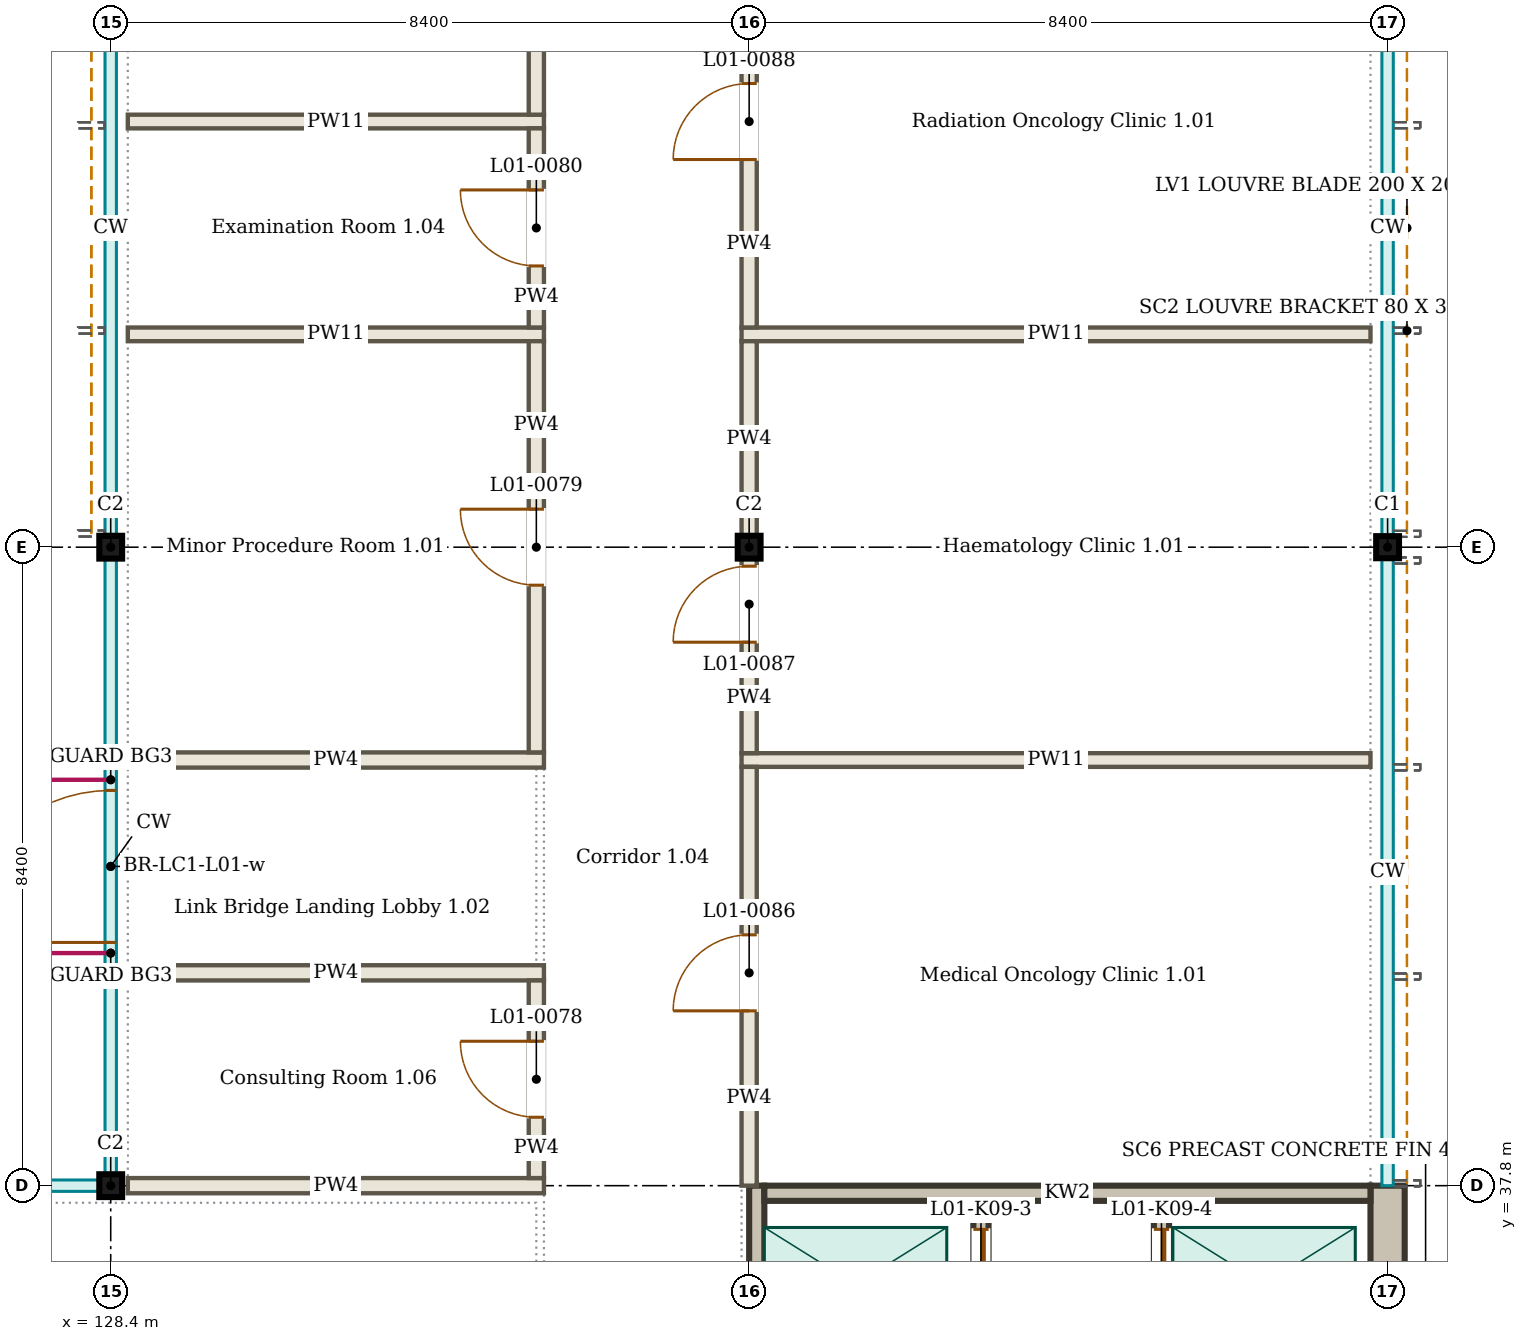
"""IFC4 building model, lengths in metres.
Left out: names, types, materials, properties, quantities, classifications, styles, units other than length and angle.
Written with IfcOpenShell. Run it as: python <this file> out.ifc"""

import sys

from ifc_helpers import new_model, si_unit, direction, frame, frame_2d, origin, origin_2d, place, context, subcontext, project, spatial, rectangle, i_section, extrude, element, fill, save


model = new_model("IFC4")
c1 = context("Model", 3, precision=1e-05, world=origin(), true_north=direction((0.0, 1.0)))
c2 = subcontext(c1, "Body", "Model", "MODEL_VIEW")
j1 = project(units=[si_unit("LENGTHUNIT", "METRE"), si_unit("PLANEANGLEUNIT", "RADIAN")], contexts=[c1])
p1 = place(None, origin())
s1 = spatial("IfcSite", under=j1, at=p1, CompositionType="ELEMENT")
p2 = place(p1, origin())
s2 = spatial("IfcBuilding", under=s1, at=p2, CompositionType="ELEMENT")
p3 = place(p2, frame((0.0, 0.0, 4.5)))
s3 = spatial("IfcBuildingStorey", under=s2, at=p3, CompositionType="ELEMENT", Elevation=4.5)
for number, where, z_axis, x_axis in (
    (1, (128.4, 37.8, 0.0), (0.0, 0.0, 1.0), (1.0, 0.0, 0.0)),
    (2, (128.4, 46.2, 0.0), (0.0, 0.0, 1.0), (1.0, 0.0, 0.0)),
    (3, (136.8, 46.2, 0.0), (0.0, 0.0, 1.0), (1.0, 0.0, 0.0)),
):
    element("IfcColumn", number, at=place(p3, frame(where, z_axis=z_axis, x_axis=x_axis)), inside=s3, PredefinedType="COLUMN", context=c2, shape_type="SweptSolid", body=[
        extrude(i_section(OverallWidth=0.3, OverallDepth=0.3, WebThickness=0.011, FlangeThickness=0.019, FilletRadius=0.027, at=origin_2d()), origin(), (0.0, 0.0, 1.0), 4.5),
    ])
p4 = place(p3, frame((145.2, 46.2, 0.0), z_axis=(0.0, 0.0, 1.0), x_axis=(1.0, 0.0, 0.0)))
e4 = element("IfcColumn", 4, at=p4, inside=s3, PredefinedType="COLUMN", context=c2, shape_type="SweptSolid", body=[
    extrude(i_section(OverallWidth=0.3, OverallDepth=0.29, WebThickness=0.009, FlangeThickness=0.014, FilletRadius=0.027, at=origin_2d()), origin(), (0.0, 0.0, 1.0), 4.5),
])
p5 = place(p3, frame((128.625, 37.8, 0.0), z_axis=(0.0, 0.0, 1.0), x_axis=(1.0, 0.0, 0.0)))
e5 = element("IfcWall", 5, at=p5, inside=s3, PredefinedType="PARTITIONING", context=c2, shape_type="SweptSolid", body=[
    extrude(rectangle(XDim=5.475, YDim=0.2, at=frame_2d((2.738, 0.0))), origin(), (0.0, 0.0, 1.0), 3.9),
])
for number, where, z_axis, x_axis in (
    (6, (128.625, 40.6, 0.0), (0.0, 0.0, 1.0), (1.0, 0.0, 0.0)),
    (7, (128.625, 43.4, 0.0), (0.0, 0.0, 1.0), (1.0, 0.0, 0.0)),
):
    element("IfcWall", number, at=place(p3, frame(where, z_axis=z_axis, x_axis=x_axis)), inside=s3, PredefinedType="PARTITIONING", context=c2, shape_type="SweptSolid", body=[
        extrude(rectangle(XDim=5.475, YDim=0.2, at=frame_2d((2.738, 0.0))), origin(), (0.0, 0.0, 1.0), 3.996),
    ])
p6 = place(p3, frame((136.7, 43.4, 0.0), z_axis=(0.0, 0.0, 1.0), x_axis=(1.0, 0.0, 0.0)))
e8 = element("IfcWall", 8, at=p6, inside=s3, PredefinedType="PARTITIONING", context=c2, shape_type="SweptSolid", body=[
    extrude(rectangle(XDim=8.275, YDim=0.18, at=frame_2d((4.138, 0.0))), origin(), (0.0, 0.0, 1.0), 3.9),
])
p7 = place(p3, frame((128.625, 49.0, 0.0), z_axis=(0.0, 0.0, 1.0), x_axis=(1.0, 0.0, 0.0)))
e9 = element("IfcWall", 9, at=p7, inside=s3, PredefinedType="PARTITIONING", context=c2, shape_type="SweptSolid", body=[
    extrude(rectangle(XDim=5.475, YDim=0.18, at=frame_2d((2.738, 0.0))), origin(), (0.0, 0.0, 1.0), 3.996),
])
p8 = place(p3, frame((136.7, 49.0, 0.0), z_axis=(0.0, 0.0, 1.0), x_axis=(1.0, 0.0, 0.0)))
e10 = element("IfcWall", 10, at=p8, inside=s3, PredefinedType="PARTITIONING", context=c2, shape_type="SweptSolid", body=[
    extrude(rectangle(XDim=8.275, YDim=0.18, at=frame_2d((4.138, 0.0))), origin(), (0.0, 0.0, 1.0), 3.9),
])
p9 = place(p3, frame((128.625, 51.8, 0.0), z_axis=(0.0, 0.0, 1.0), x_axis=(1.0, 0.0, 0.0)))
e11 = element("IfcWall", 11, at=p9, inside=s3, PredefinedType="PARTITIONING", context=c2, shape_type="SweptSolid", body=[
    extrude(rectangle(XDim=5.475, YDim=0.18, at=frame_2d((2.738, 0.0))), origin(), (0.0, 0.0, 1.0), 3.996),
])
p10 = place(p3, frame((134.0, 37.9, 0.0), z_axis=(0.0, 0.0, 1.0), x_axis=(0.0, 1.0, 0.0)))
e12 = element("IfcWall", 12, at=p10, inside=s3, PredefinedType="PARTITIONING", context=c2, shape_type="SweptSolid", body=[
    extrude(rectangle(XDim=2.6, YDim=0.2, at=frame_2d((1.3, 0.0))), origin(), (0.0, 0.0, 1.0), 3.996),
])
p11 = place(p10, frame((0.8, 0.0, 0.0)))
e13 = element("IfcOpeningElement", 13, at=p11, cuts=e12, PredefinedType="OPENING", context=c2, shape_type="SweptSolid", body=[
    extrude(rectangle(XDim=1.0, YDim=2.1, at=frame_2d((0.5, 1.05))), frame((0.0, 0.11, 0.0), z_axis=(0.0, -1.0, 0.0), x_axis=(1.0, 0.0, 0.0)), (0.0, 0.0, 1.0), 0.22),
])
p12 = place(p3, frame((134.0, 43.5, 0.0), z_axis=(0.0, 0.0, 1.0), x_axis=(0.0, 1.0, 0.0)))
e14 = element("IfcWall", 14, at=p12, inside=s3, PredefinedType="PARTITIONING", context=c2, shape_type="SweptSolid", body=[
    extrude(rectangle(XDim=5.41, YDim=0.2, at=frame_2d((2.705, 0.0))), origin(), (0.0, 0.0, 1.0), 3.9),
])
p13 = place(p12, frame((2.2, 0.0, 0.0)))
e15 = element("IfcOpeningElement", 15, at=p13, cuts=e14, PredefinedType="OPENING", context=c2, shape_type="SweptSolid", body=[
    extrude(rectangle(XDim=1.0, YDim=2.1, at=frame_2d((0.5, 1.05))), frame((0.0, 0.11, 0.0), z_axis=(0.0, -1.0, 0.0), x_axis=(1.0, 0.0, 0.0)), (0.0, 0.0, 1.0), 0.22),
])
p14 = place(p3, frame((134.0, 49.09, 0.0), z_axis=(0.0, 0.0, 1.0), x_axis=(0.0, 1.0, 0.0)))
e16 = element("IfcWall", 16, at=p14, inside=s3, PredefinedType="PARTITIONING", context=c2, shape_type="SweptSolid", body=[
    extrude(rectangle(XDim=2.62, YDim=0.2, at=frame_2d((1.31, 0.0))), origin(), (0.0, 0.0, 1.0), 3.996),
])
p15 = place(p14, frame((0.81, 0.0, 0.0)))
e17 = element("IfcOpeningElement", 17, at=p15, cuts=e16, PredefinedType="OPENING", context=c2, shape_type="SweptSolid", body=[
    extrude(rectangle(XDim=1.0, YDim=2.1, at=frame_2d((0.5, 1.05))), frame((0.0, 0.11, 0.0), z_axis=(0.0, -1.0, 0.0), x_axis=(1.0, 0.0, 0.0)), (0.0, 0.0, 1.0), 0.22),
])
p16 = place(p3, frame((134.0, 51.89, 0.0), z_axis=(0.0, 0.0, 1.0), x_axis=(0.0, 1.0, 0.0)))
e18 = element("IfcWall", 18, at=p16, inside=s3, PredefinedType="PARTITIONING", context=c2, shape_type="SweptSolid", body=[
    extrude(rectangle(XDim=2.61, YDim=0.2, at=frame_2d((1.305, 0.0))), origin(), (0.0, 0.0, 1.0), 3.996),
])
p17 = place(p3, frame((136.8, 37.8, 0.0), z_axis=(0.0, 0.0, 1.0), x_axis=(0.0, 1.0, 0.0)))
e19 = element("IfcWall", 19, at=p17, inside=s3, PredefinedType="PARTITIONING", context=c2, shape_type="SweptSolid", body=[
    extrude(rectangle(XDim=5.51, YDim=0.2, at=frame_2d((2.755, 0.0))), origin(), (0.0, 0.0, 1.0), 3.9),
])
p18 = place(p17, frame((2.3, 0.0, 0.0)))
e20 = element("IfcOpeningElement", 20, at=p18, cuts=e19, PredefinedType="OPENING", context=c2, shape_type="SweptSolid", body=[
    extrude(rectangle(XDim=1.0, YDim=2.1, at=frame_2d((0.5, 1.05))), frame((0.0, 0.11, 0.0), z_axis=(0.0, -1.0, 0.0), x_axis=(1.0, 0.0, 0.0)), (0.0, 0.0, 1.0), 0.22),
])
p19 = place(p3, frame((136.8, 43.49, 0.0), z_axis=(0.0, 0.0, 1.0), x_axis=(0.0, 1.0, 0.0)))
e21 = element("IfcWall", 21, at=p19, inside=s3, PredefinedType="PARTITIONING", context=c2, shape_type="SweptSolid", body=[
    extrude(rectangle(XDim=2.56, YDim=0.2, at=frame_2d((1.28, 0.0))), origin(), (0.0, 0.0, 1.0), 3.9),
])
p20 = place(p19, frame((1.46, 0.0, 0.0)))
e22 = element("IfcOpeningElement", 22, at=p20, cuts=e21, PredefinedType="OPENING", context=c2, shape_type="SweptSolid", body=[
    extrude(rectangle(XDim=1.0, YDim=2.1, at=frame_2d((0.5, 1.05))), frame((0.0, 0.11, 0.0), z_axis=(0.0, -1.0, 0.0), x_axis=(1.0, 0.0, 0.0)), (0.0, 0.0, 1.0), 0.22),
])
p21 = place(p3, frame((136.8, 46.35, 0.0), z_axis=(0.0, 0.0, 1.0), x_axis=(0.0, 1.0, 0.0)))
e23 = element("IfcWall", 23, at=p21, inside=s3, PredefinedType="PARTITIONING", context=c2, shape_type="SweptSolid", body=[
    extrude(rectangle(XDim=2.56, YDim=0.2, at=frame_2d((1.28, 0.0))), origin(), (0.0, 0.0, 1.0), 3.9),
])
p22 = place(p3, frame((136.8, 49.09, 0.0), z_axis=(0.0, 0.0, 1.0), x_axis=(0.0, 1.0, 0.0)))
e24 = element("IfcWall", 24, at=p22, inside=s3, PredefinedType="PARTITIONING", context=c2, shape_type="SweptSolid", body=[
    extrude(rectangle(XDim=5.36, YDim=0.2, at=frame_2d((2.68, 0.0))), origin(), (0.0, 0.0, 1.0), 3.9),
])
p23 = place(p22, frame((2.21, 0.0, 0.0)))
e25 = element("IfcOpeningElement", 25, at=p23, cuts=e24, PredefinedType="OPENING", context=c2, shape_type="SweptSolid", body=[
    extrude(rectangle(XDim=1.0, YDim=2.1, at=frame_2d((0.5, 1.05))), frame((0.0, 0.11, 0.0), z_axis=(0.0, -1.0, 0.0), x_axis=(1.0, 0.0, 0.0)), (0.0, 0.0, 1.0), 0.22),
])
p24 = place(p3, frame((136.9, 29.625, 0.0), z_axis=(0.0, 0.0, 1.0), x_axis=(0.0, 1.0, 0.0)))
e26 = element("IfcWall", 26, at=p24, inside=s3, PredefinedType="SOLIDWALL", context=c2, shape_type="SweptSolid", body=[
    extrude(rectangle(XDim=8.175, YDim=0.2, at=frame_2d((4.087, 0.0))), origin(), (0.0, 0.0, 1.0), 4.5),
])
p25 = place(p24, frame((4.512, 0.0, 0.0)))
e27 = element("IfcOpeningElement", 27, at=p25, cuts=e26, PredefinedType="OPENING", context=c2, shape_type="SweptSolid", body=[
    extrude(rectangle(XDim=1.3, YDim=2.1, at=frame_2d((0.65, 1.05))), frame((0.0, 0.11, 0.0), z_axis=(0.0, -1.0, 0.0), x_axis=(1.0, 0.0, 0.0)), (0.0, 0.0, 1.0), 0.22),
])
p26 = place(p3, frame((145.2, 29.175, 0.0), z_axis=(0.0, 0.0, 1.0), x_axis=(0.0, 1.0, 0.0)))
e28 = element("IfcWall", 28, at=p26, inside=s3, PredefinedType="SOLIDWALL", context=c2, shape_type="SweptSolid", body=[
    extrude(rectangle(XDim=8.625, YDim=0.45, at=frame_2d((4.312, 0.0))), origin(), (0.0, 0.0, 1.0), 4.5),
])
p27 = place(p3, frame((137.0, 37.7, 0.0), z_axis=(0.0, 0.0, 1.0), x_axis=(1.0, 0.0, 0.0)))
e29 = element("IfcWall", 29, at=p27, inside=s3, PredefinedType="SOLIDWALL", context=c2, shape_type="SweptSolid", body=[
    extrude(rectangle(XDim=7.975, YDim=0.2, at=frame_2d((3.988, 0.0))), origin(), (0.0, 0.0, 1.0), 4.5),
])
p28 = place(p3, frame((139.85, 35.75, 0.0), z_axis=(0.0, 0.0, 1.0), x_axis=(0.0, 1.0, 0.0)))
e30 = element("IfcWall", 30, at=p28, inside=s3, PredefinedType="SOLIDWALL", context=c2, shape_type="SweptSolid", body=[
    extrude(rectangle(XDim=1.85, YDim=0.2, at=frame_2d((0.925, 0.0))), origin(), (0.0, 0.0, 1.0), 4.5),
])
p29 = place(p28, frame((0.375, 0.0, 0.0)))
e31 = element("IfcOpeningElement", 31, at=p29, cuts=e30, PredefinedType="OPENING", context=c2, shape_type="SweptSolid", body=[
    extrude(rectangle(XDim=1.1, YDim=2.1, at=frame_2d((0.55, 1.05))), frame((0.0, 0.11, 0.0), z_axis=(0.0, -1.0, 0.0), x_axis=(1.0, 0.0, 0.0)), (0.0, 0.0, 1.0), 0.22),
])
p30 = place(p3, frame((142.225, 35.75, 0.0), z_axis=(0.0, 0.0, 1.0), x_axis=(0.0, 1.0, 0.0)))
e32 = element("IfcWall", 32, at=p30, inside=s3, PredefinedType="SOLIDWALL", context=c2, shape_type="SweptSolid", body=[
    extrude(rectangle(XDim=1.85, YDim=0.2, at=frame_2d((0.925, 0.0))), origin(), (0.0, 0.0, 1.0), 4.5),
])
p31 = place(p30, frame((0.375, 0.0, 0.0)))
e33 = element("IfcOpeningElement", 33, at=p31, cuts=e32, PredefinedType="OPENING", context=c2, shape_type="SweptSolid", body=[
    extrude(rectangle(XDim=1.1, YDim=2.1, at=frame_2d((0.55, 1.05))), frame((0.0, 0.11, 0.0), z_axis=(0.0, -1.0, 0.0), x_axis=(1.0, 0.0, 0.0)), (0.0, 0.0, 1.0), 0.22),
])
p32 = place(p3, frame((128.4, 37.95, 0.0), z_axis=(0.0, 0.0, 1.0), x_axis=(0.0, 1.0, 0.0)))
p33 = place(p32, frame((3.05, 0.0, 0.0)))
p34 = place(p33, origin())
e34 = element("IfcDoor", 34, at=p34, inside=s3, OperationType="SINGLE_SWING_LEFT", PredefinedType="DOOR", context=c2, shape_type="SweptSolid", body=[
    extrude(rectangle(XDim=2.0, YDim=2.4, at=frame_2d((1.0, 1.2))), frame((0.0, 0.025, 0.0), z_axis=(0.0, -1.0, 0.0), x_axis=(1.0, 0.0, 0.0)), (0.0, 0.0, 1.0), 0.05),
])
p35 = place(p11, origin())
e35 = element("IfcDoor", 35, at=p35, inside=s3, OperationType="SINGLE_SWING_RIGHT", PredefinedType="DOOR", context=c2, shape_type="SweptSolid", body=[
    extrude(rectangle(XDim=1.0, YDim=2.1, at=frame_2d((0.5, 1.05))), frame((0.0, 0.025, 0.0), z_axis=(0.0, -1.0, 0.0), x_axis=(1.0, 0.0, 0.0)), (0.0, 0.0, 1.0), 0.05),
])
fill(e13, e35)
p36 = place(p13, origin())
e36 = element("IfcDoor", 36, at=p36, inside=s3, OperationType="SINGLE_SWING_RIGHT", PredefinedType="DOOR", context=c2, shape_type="SweptSolid", body=[
    extrude(rectangle(XDim=1.0, YDim=2.1, at=frame_2d((0.5, 1.05))), frame((0.0, 0.025, 0.0), z_axis=(0.0, -1.0, 0.0), x_axis=(1.0, 0.0, 0.0)), (0.0, 0.0, 1.0), 0.05),
])
fill(e15, e36)
p37 = place(p15, origin())
e37 = element("IfcDoor", 37, at=p37, inside=s3, OperationType="SINGLE_SWING_RIGHT", PredefinedType="DOOR", context=c2, shape_type="SweptSolid", body=[
    extrude(rectangle(XDim=1.0, YDim=2.1, at=frame_2d((0.5, 1.05))), frame((0.0, 0.025, 0.0), z_axis=(0.0, -1.0, 0.0), x_axis=(1.0, 0.0, 0.0)), (0.0, 0.0, 1.0), 0.05),
])
fill(e17, e37)
p38 = place(p18, origin())
e38 = element("IfcDoor", 38, at=p38, inside=s3, OperationType="SINGLE_SWING_LEFT", PredefinedType="DOOR", context=c2, shape_type="SweptSolid", body=[
    extrude(rectangle(XDim=1.0, YDim=2.1, at=frame_2d((0.5, 1.05))), frame((0.0, 0.025, 0.0), z_axis=(0.0, -1.0, 0.0), x_axis=(1.0, 0.0, 0.0)), (0.0, 0.0, 1.0), 0.05),
])
fill(e20, e38)
p39 = place(p20, origin())
e39 = element("IfcDoor", 39, at=p39, inside=s3, OperationType="SINGLE_SWING_LEFT", PredefinedType="DOOR", context=c2, shape_type="SweptSolid", body=[
    extrude(rectangle(XDim=1.0, YDim=2.1, at=frame_2d((0.5, 1.05))), frame((0.0, 0.025, 0.0), z_axis=(0.0, -1.0, 0.0), x_axis=(1.0, 0.0, 0.0)), (0.0, 0.0, 1.0), 0.05),
])
fill(e22, e39)
p40 = place(p23, origin())
e40 = element("IfcDoor", 40, at=p40, inside=s3, OperationType="SINGLE_SWING_LEFT", PredefinedType="DOOR", context=c2, shape_type="SweptSolid", body=[
    extrude(rectangle(XDim=1.0, YDim=2.1, at=frame_2d((0.5, 1.05))), frame((0.0, 0.025, 0.0), z_axis=(0.0, -1.0, 0.0), x_axis=(1.0, 0.0, 0.0)), (0.0, 0.0, 1.0), 0.05),
])
fill(e25, e40)
p41 = place(p29, origin())
e41 = element("IfcDoor", 41, at=p41, inside=s3, OperationType="DOUBLE_DOOR_SLIDING", PredefinedType="DOOR", context=c2, shape_type="SweptSolid", body=[
    extrude(rectangle(XDim=1.1, YDim=2.1, at=frame_2d((0.55, 1.05))), frame((0.0, 0.025, 0.0), z_axis=(0.0, -1.0, 0.0), x_axis=(1.0, 0.0, 0.0)), (0.0, 0.0, 1.0), 0.05),
])
fill(e31, e41)
p42 = place(p31, origin())
e42 = element("IfcDoor", 42, at=p42, inside=s3, OperationType="DOUBLE_DOOR_SLIDING", PredefinedType="DOOR", context=c2, shape_type="SweptSolid", body=[
    extrude(rectangle(XDim=1.1, YDim=2.1, at=frame_2d((0.55, 1.05))), frame((0.0, 0.025, 0.0), z_axis=(0.0, -1.0, 0.0), x_axis=(1.0, 0.0, 0.0)), (0.0, 0.0, 1.0), 0.05),
])
fill(e33, e42)
save(model, sys.argv[1])
